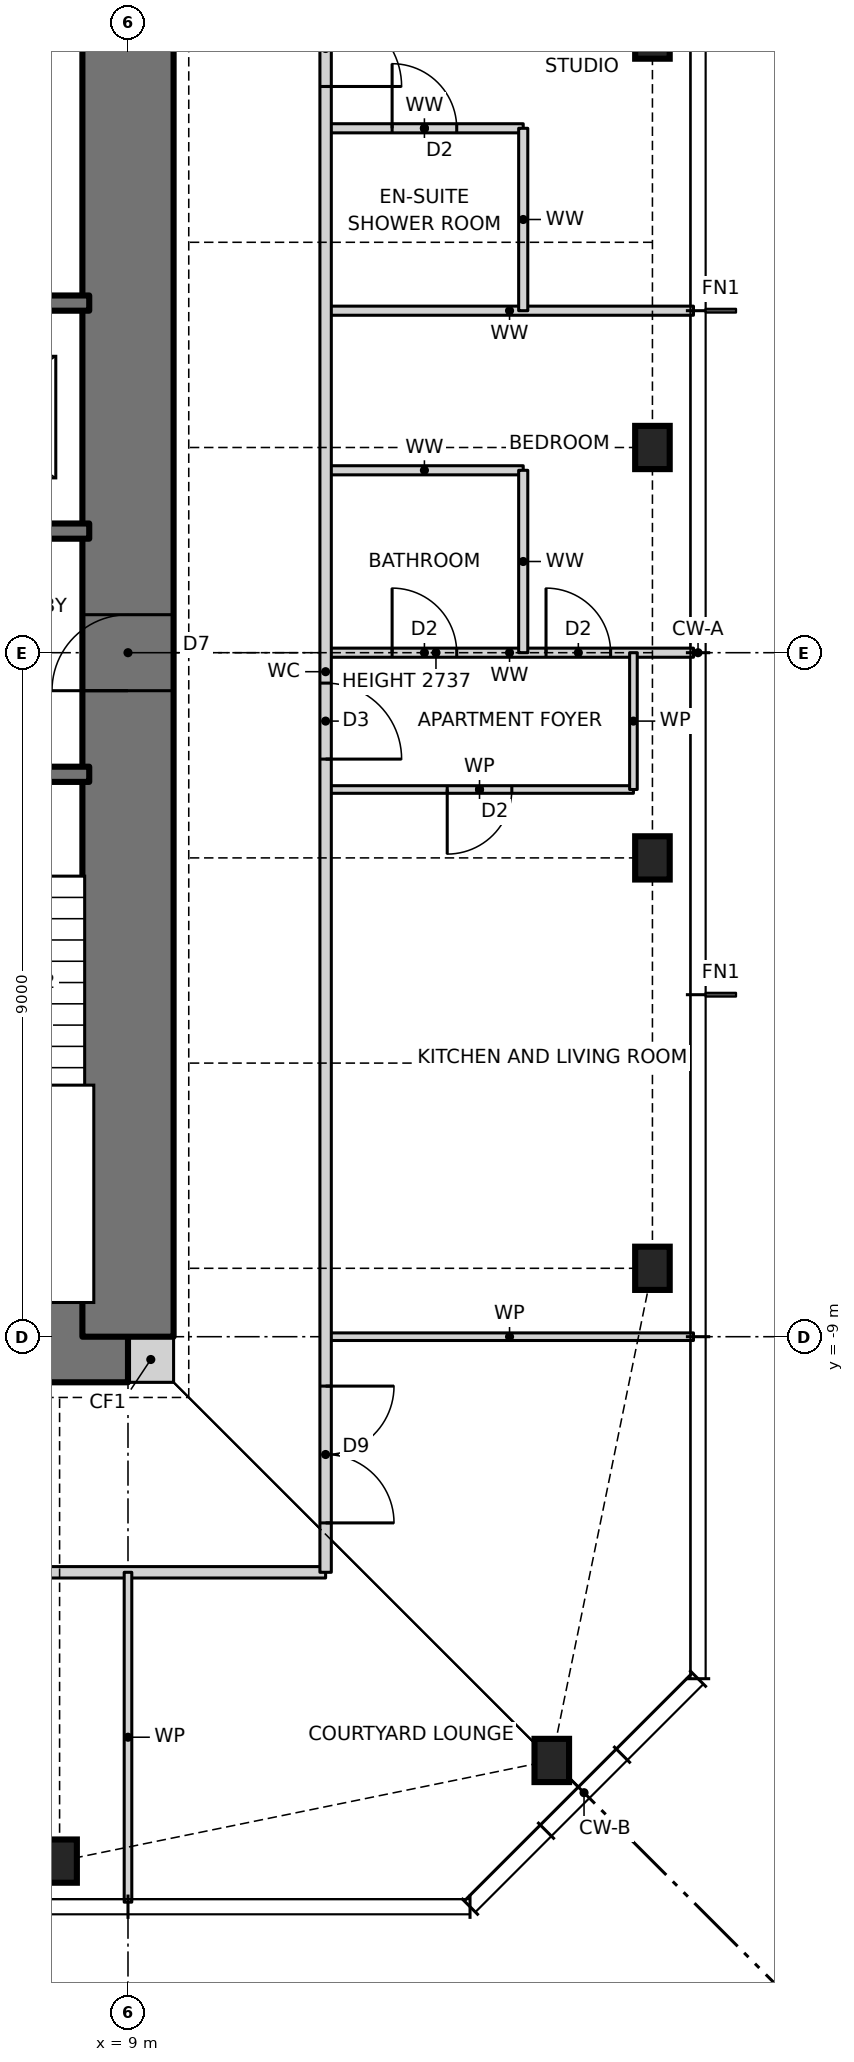
"""IFC4 building model, lengths in metres.
Left out: names, types, materials, properties, quantities, classifications, styles, units other than length and angle.
Written with IfcOpenShell. Run it as: python <this file> out.ifc"""

import sys

from ifc_helpers import new_model, si_unit, direction, frame, frame_2d, origin, origin_2d, place, context, subcontext, project, spatial, rectangle, i_section, extrude, element, fill, save


model = new_model("IFC4")
c1 = context("Model", 3, precision=1e-05, world=origin(), true_north=direction((0.0, 1.0)))
c2 = subcontext(c1, "Body", "Model", "MODEL_VIEW")
j1 = project(units=[si_unit("LENGTHUNIT", "METRE"), si_unit("PLANEANGLEUNIT", "RADIAN")], contexts=[c1])
p1 = place(None, origin())
s1 = spatial("IfcSite", under=j1, at=p1, CompositionType="ELEMENT")
p2 = place(p1, origin())
s2 = spatial("IfcBuilding", under=s1, at=p2, CompositionType="ELEMENT")
p3 = place(p2, frame((0.0, 0.0, 232.5)))
s3 = spatial("IfcBuildingStorey", under=s2, at=p3, CompositionType="ELEMENT", Elevation=232.5)
for number, where, z_axis, x_axis in (
    (1, (8.1, -15.9, 0.0), (0.0, 0.0, 1.0), (1.0, 0.0, 0.0)),
    (2, (14.576, -14.576, 0.0), (0.0, 0.0, 1.0), (1.0, 0.0, 0.0)),
    (3, (15.9, -8.1, 0.0), (0.0, 0.0, 1.0), (1.0, 0.0, 0.0)),
    (4, (15.9, -2.7, 0.0), (0.0, 0.0, 1.0), (1.0, 0.0, 0.0)),
    (5, (15.9, 2.7, 0.0), (0.0, 0.0, 1.0), (1.0, 0.0, 0.0)),
    (6, (15.9, 8.1, 0.0), (0.0, 0.0, 1.0), (1.0, 0.0, 0.0)),
):
    element("IfcColumn", number, at=place(p3, frame(where, z_axis=z_axis, x_axis=x_axis)), inside=s3, PredefinedType="COLUMN", context=c2, shape_type="SweptSolid", body=[
        extrude(i_section(OverallWidth=0.455, OverallDepth=0.569, WebThickness=0.078, FlangeThickness=0.125, at=origin_2d()), origin(), (0.0, 0.0, 1.0), 3.5),
    ])
p4 = place(p3, frame((9.0, -9.3, 0.0), z_axis=(0.0, 0.0, 1.0), x_axis=(1.0, 0.0, 0.0)))
e7 = element("IfcWall", 7, at=p4, inside=s3, PredefinedType="SOLIDWALL", context=c2, shape_type="SweptSolid", body=[
    extrude(rectangle(XDim=0.6, YDim=0.6, at=frame_2d((0.3, 0.0))), origin(), (0.0, 0.0, 1.0), 3.5),
])
p5 = place(p3, frame((-9.0, -9.0, 0.0), z_axis=(0.0, 0.0, 1.0), x_axis=(1.0, 0.0, 0.0)))
e8 = element("IfcWall", 8, at=p5, inside=s3, PredefinedType="SHEAR", context=c2, shape_type="SweptSolid", body=[
    extrude(rectangle(XDim=18.0, YDim=1.2, at=frame_2d((9.0, 0.0))), origin(), (0.0, 0.0, 1.0), 3.5),
])
p6 = place(p5, frame((3.775, 0.0, 0.0)))
e9 = element("IfcOpeningElement", 9, at=p6, cuts=e8, PredefinedType="OPENING", context=c2, shape_type="SweptSolid", body=[
    extrude(rectangle(XDim=0.9, YDim=2.1, at=frame_2d((0.45, 1.05))), frame((0.0, 0.61, 0.0), z_axis=(0.0, -1.0, 0.0), x_axis=(1.0, 0.0, 0.0)), (0.0, 0.0, 1.0), 1.22),
])
p7 = place(p5, frame((10.625, 0.0, 0.0)))
e10 = element("IfcOpeningElement", 10, at=p7, cuts=e8, PredefinedType="OPENING", context=c2, shape_type="SweptSolid", body=[
    extrude(rectangle(XDim=0.9, YDim=2.1, at=frame_2d((0.45, 1.05))), frame((0.0, 0.61, 0.0), z_axis=(0.0, -1.0, 0.0), x_axis=(1.0, 0.0, 0.0)), (0.0, 0.0, 1.0), 1.22),
])
p8 = place(p3, frame((9.0, -9.0, 0.0), z_axis=(0.0, 0.0, 1.0), x_axis=(0.0, 1.0, 0.0)))
e11 = element("IfcWall", 11, at=p8, inside=s3, PredefinedType="SHEAR", context=c2, shape_type="SweptSolid", body=[
    extrude(rectangle(XDim=18.0, YDim=1.2, at=frame_2d((9.0, 0.0))), origin(), (0.0, 0.0, 1.0), 3.5),
])
p9 = place(p8, frame((8.5, 0.0, 0.0)))
e12 = element("IfcOpeningElement", 12, at=p9, cuts=e11, PredefinedType="OPENING", context=c2, shape_type="SweptSolid", body=[
    extrude(rectangle(XDim=1.0, YDim=2.1, at=frame_2d((0.5, 1.05))), frame((0.0, 0.61, 0.0), z_axis=(0.0, -1.0, 0.0), x_axis=(1.0, 0.0, 0.0)), (0.0, 0.0, 1.0), 1.22),
])
p10 = place(p3, frame((-11.6, -12.1, 0.0), z_axis=(0.0, 0.0, 1.0), x_axis=(1.0, 0.0, 0.0)))
e13 = element("IfcWall", 13, at=p10, inside=s3, PredefinedType="PARTITIONING", context=c2, shape_type="SweptSolid", body=[
    extrude(rectangle(XDim=23.2, YDim=0.15, at=frame_2d((11.6, 0.0))), origin(), (0.0, 0.0, 1.0), 3.27),
])
p11 = place(p10, frame((10.2, 0.0, 0.0)))
e14 = element("IfcOpeningElement", 14, at=p11, cuts=e13, PredefinedType="OPENING", context=c2, shape_type="SweptSolid", body=[
    extrude(rectangle(XDim=1.0, YDim=2.1, at=frame_2d((0.5, 1.05))), frame((0.0, 0.085, 0.0), z_axis=(0.0, -1.0, 0.0), x_axis=(1.0, 0.0, 0.0)), (0.0, 0.0, 1.0), 0.17),
])
p12 = place(p10, frame((17.45, 0.0, 0.0)))
e15 = element("IfcOpeningElement", 15, at=p12, cuts=e13, PredefinedType="OPENING", context=c2, shape_type="SweptSolid", body=[
    extrude(rectangle(XDim=1.8, YDim=2.1, at=frame_2d((0.9, 1.05))), frame((0.0, 0.085, 0.0), z_axis=(0.0, -1.0, 0.0), x_axis=(1.0, 0.0, 0.0)), (0.0, 0.0, 1.0), 0.17),
])
p13 = place(p3, frame((11.6, -9.0, 0.0), z_axis=(0.0, 0.0, 1.0), x_axis=(1.0, 0.0, 0.0)))
e16 = element("IfcWall", 16, at=p13, inside=s3, PredefinedType="PARTITIONING", context=c2, shape_type="SweptSolid", body=[
    extrude(rectangle(XDim=4.84, YDim=0.1, at=frame_2d((2.42, 0.0))), origin(), (0.0, 0.0, 1.0), 3.27),
])
p14 = place(p3, frame((11.6, -1.8, 0.0), z_axis=(0.0, 0.0, 1.0), x_axis=(1.0, 0.0, 0.0)))
e17 = element("IfcWall", 17, at=p14, inside=s3, PredefinedType="PARTITIONING", context=c2, shape_type="SweptSolid", body=[
    extrude(rectangle(XDim=4.05, YDim=0.1, at=frame_2d((2.025, 0.0))), origin(), (0.0, 0.0, 1.0), 3.27),
])
p15 = place(p14, frame((1.6, 0.0, 0.0)))
e18 = element("IfcOpeningElement", 18, at=p15, cuts=e17, PredefinedType="OPENING", context=c2, shape_type="SweptSolid", body=[
    extrude(rectangle(XDim=0.85, YDim=2.1, at=frame_2d((0.425, 1.05))), frame((0.0, 0.06, 0.0), z_axis=(0.0, -1.0, 0.0), x_axis=(1.0, 0.0, 0.0)), (0.0, 0.0, 1.0), 0.12),
])
p16 = place(p3, frame((-8.49, -1.6, 0.0), z_axis=(0.0, 0.0, 1.0), x_axis=(1.0, 0.0, 0.0)))
e19 = element("IfcWall", 19, at=p16, inside=s3, PredefinedType="SOLIDWALL", context=c2, shape_type="SweptSolid", body=[
    extrude(rectangle(XDim=16.98, YDim=0.2, at=frame_2d((8.49, 0.0))), origin(), (0.0, 0.0, 1.0), 3.5),
])
p17 = place(p16, frame((14.81, 0.0, 0.0)))
e20 = element("IfcOpeningElement", 20, at=p17, cuts=e19, PredefinedType="OPENING", context=c2, shape_type="SweptSolid", body=[
    extrude(rectangle(XDim=1.0, YDim=2.1, at=frame_2d((0.5, 1.05))), frame((0.0, 0.11, 0.0), z_axis=(0.0, -1.0, 0.0), x_axis=(1.0, 0.0, 0.0)), (0.0, 0.0, 1.0), 0.22),
])
p18 = place(p16, frame((1.232, 0.0, 0.0)))
e21 = element("IfcOpeningElement", 21, at=p18, cuts=e19, PredefinedType="OPENING", context=c2, shape_type="SweptSolid", body=[
    extrude(rectangle(XDim=0.9, YDim=2.1, at=frame_2d((0.45, 1.05))), frame((0.0, 0.11, 0.0), z_axis=(0.0, -1.0, 0.0), x_axis=(1.0, 0.0, 0.0)), (0.0, 0.0, 1.0), 0.22),
])
p19 = place(p16, frame((4.627, 0.0, 0.0)))
e22 = element("IfcOpeningElement", 22, at=p19, cuts=e19, PredefinedType="OPENING", context=c2, shape_type="SweptSolid", body=[
    extrude(rectangle(XDim=0.9, YDim=2.1, at=frame_2d((0.45, 1.05))), frame((0.0, 0.11, 0.0), z_axis=(0.0, -1.0, 0.0), x_axis=(1.0, 0.0, 0.0)), (0.0, 0.0, 1.0), 0.22),
])
p20 = place(p16, frame((8.052, 0.0, 0.0)))
e23 = element("IfcOpeningElement", 23, at=p20, cuts=e19, PredefinedType="OPENING", context=c2, shape_type="SweptSolid", body=[
    extrude(rectangle(XDim=0.9, YDim=2.1, at=frame_2d((0.45, 1.05))), frame((0.0, 0.11, 0.0), z_axis=(0.0, -1.0, 0.0), x_axis=(1.0, 0.0, 0.0)), (0.0, 0.0, 1.0), 0.22),
])
p21 = place(p16, frame((11.478, 0.0, 0.0)))
e24 = element("IfcOpeningElement", 24, at=p21, cuts=e19, PredefinedType="OPENING", context=c2, shape_type="SweptSolid", body=[
    extrude(rectangle(XDim=0.9, YDim=2.1, at=frame_2d((0.45, 1.05))), frame((0.0, 0.11, 0.0), z_axis=(0.0, -1.0, 0.0), x_axis=(1.0, 0.0, 0.0)), (0.0, 0.0, 1.0), 0.22),
])
p22 = place(p3, frame((11.6, 0.0, 0.0), z_axis=(0.0, 0.0, 1.0), x_axis=(1.0, 0.0, 0.0)))
e25 = element("IfcWall", 25, at=p22, inside=s3, PredefinedType="PARTITIONING", context=c2, shape_type="SweptSolid", body=[
    extrude(rectangle(XDim=4.84, YDim=0.12, at=frame_2d((2.42, 0.0))), origin(), (0.0, 0.0, 1.0), 2.737),
])
p23 = place(p22, frame((2.9, 0.0, 0.0)))
e26 = element("IfcOpeningElement", 26, at=p23, cuts=e25, PredefinedType="OPENING", context=c2, shape_type="SweptSolid", body=[
    extrude(rectangle(XDim=0.85, YDim=2.1, at=frame_2d((0.425, 1.05))), frame((0.0, 0.07, 0.0), z_axis=(0.0, -1.0, 0.0), x_axis=(1.0, 0.0, 0.0)), (0.0, 0.0, 1.0), 0.14),
])
p24 = place(p22, frame((0.875, 0.0, 0.0)))
e27 = element("IfcOpeningElement", 27, at=p24, cuts=e25, PredefinedType="OPENING", context=c2, shape_type="SweptSolid", body=[
    extrude(rectangle(XDim=0.85, YDim=2.1, at=frame_2d((0.425, 1.05))), frame((0.0, 0.07, 0.0), z_axis=(0.0, -1.0, 0.0), x_axis=(1.0, 0.0, 0.0)), (0.0, 0.0, 1.0), 0.14),
])
p25 = place(p3, frame((-8.49, 1.6, 0.0), z_axis=(0.0, 0.0, 1.0), x_axis=(1.0, 0.0, 0.0)))
e28 = element("IfcWall", 28, at=p25, inside=s3, PredefinedType="SOLIDWALL", context=c2, shape_type="SweptSolid", body=[
    extrude(rectangle(XDim=16.98, YDim=0.2, at=frame_2d((8.49, 0.0))), origin(), (0.0, 0.0, 1.0), 3.5),
])
p26 = place(p25, frame((1.17, 0.0, 0.0)))
e29 = element("IfcOpeningElement", 29, at=p26, cuts=e28, PredefinedType="OPENING", context=c2, shape_type="SweptSolid", body=[
    extrude(rectangle(XDim=1.0, YDim=2.1, at=frame_2d((0.5, 1.05))), frame((0.0, 0.11, 0.0), z_axis=(0.0, -1.0, 0.0), x_axis=(1.0, 0.0, 0.0)), (0.0, 0.0, 1.0), 0.22),
])
p27 = place(p25, frame((4.606, 0.0, 0.0)))
e30 = element("IfcOpeningElement", 30, at=p27, cuts=e28, PredefinedType="OPENING", context=c2, shape_type="SweptSolid", body=[
    extrude(rectangle(XDim=0.9, YDim=2.1, at=frame_2d((0.45, 1.05))), frame((0.0, 0.11, 0.0), z_axis=(0.0, -1.0, 0.0), x_axis=(1.0, 0.0, 0.0)), (0.0, 0.0, 1.0), 0.22),
])
p28 = place(p25, frame((8.04, 0.0, 0.0)))
e31 = element("IfcOpeningElement", 31, at=p28, cuts=e28, PredefinedType="OPENING", context=c2, shape_type="SweptSolid", body=[
    extrude(rectangle(XDim=0.9, YDim=2.1, at=frame_2d((0.45, 1.05))), frame((0.0, 0.11, 0.0), z_axis=(0.0, -1.0, 0.0), x_axis=(1.0, 0.0, 0.0)), (0.0, 0.0, 1.0), 0.22),
])
p29 = place(p25, frame((11.374, 0.0, 0.0)))
e32 = element("IfcOpeningElement", 32, at=p29, cuts=e28, PredefinedType="OPENING", context=c2, shape_type="SweptSolid", body=[
    extrude(rectangle(XDim=1.1, YDim=2.1, at=frame_2d((0.55, 1.05))), frame((0.0, 0.11, 0.0), z_axis=(0.0, -1.0, 0.0), x_axis=(1.0, 0.0, 0.0)), (0.0, 0.0, 1.0), 0.22),
])
p30 = place(p25, frame((14.66, 0.0, 0.0)))
e33 = element("IfcOpeningElement", 33, at=p30, cuts=e28, PredefinedType="OPENING", context=c2, shape_type="SweptSolid", body=[
    extrude(rectangle(XDim=1.3, YDim=2.1, at=frame_2d((0.65, 1.05))), frame((0.0, 0.11, 0.0), z_axis=(0.0, -1.0, 0.0), x_axis=(1.0, 0.0, 0.0)), (0.0, 0.0, 1.0), 0.22),
])
p31 = place(p3, frame((11.6, 2.4, 0.0), z_axis=(0.0, 0.0, 1.0), x_axis=(1.0, 0.0, 0.0)))
e34 = element("IfcWall", 34, at=p31, inside=s3, PredefinedType="PARTITIONING", context=c2, shape_type="SweptSolid", body=[
    extrude(rectangle(XDim=2.6, YDim=0.12, at=frame_2d((1.3, 0.0))), origin(), (0.0, 0.0, 1.0), 3.27),
])
p32 = place(p3, frame((11.6, 4.5, 0.0), z_axis=(0.0, 0.0, 1.0), x_axis=(1.0, 0.0, 0.0)))
e35 = element("IfcWall", 35, at=p32, inside=s3, PredefinedType="PARTITIONING", context=c2, shape_type="SweptSolid", body=[
    extrude(rectangle(XDim=4.84, YDim=0.12, at=frame_2d((2.42, 0.0))), origin(), (0.0, 0.0, 1.0), 3.27),
])
p33 = place(p3, frame((5.15, 4.6, 0.0), z_axis=(0.0, 0.0, 1.0), x_axis=(1.0, 0.0, 0.0)))
e36 = element("IfcWall", 36, at=p33, inside=s3, PredefinedType="SOLIDWALL", context=c2, shape_type="SweptSolid", body=[
    extrude(rectangle(XDim=3.34, YDim=0.2, at=frame_2d((1.67, 0.0))), origin(), (0.0, 0.0, 1.0), 3.5),
])
p34 = place(p3, frame((11.6, 6.9, 0.0), z_axis=(0.0, 0.0, 1.0), x_axis=(1.0, 0.0, 0.0)))
e37 = element("IfcWall", 37, at=p34, inside=s3, PredefinedType="PARTITIONING", context=c2, shape_type="SweptSolid", body=[
    extrude(rectangle(XDim=2.6, YDim=0.12, at=frame_2d((1.3, 0.0))), origin(), (0.0, 0.0, 1.0), 3.27),
])
p35 = place(p34, frame((0.875, 0.0, 0.0)))
e38 = element("IfcOpeningElement", 38, at=p35, cuts=e37, PredefinedType="OPENING", context=c2, shape_type="SweptSolid", body=[
    extrude(rectangle(XDim=0.85, YDim=2.1, at=frame_2d((0.425, 1.05))), frame((0.0, 0.07, 0.0), z_axis=(0.0, -1.0, 0.0), x_axis=(1.0, 0.0, 0.0)), (0.0, 0.0, 1.0), 0.14),
])
p36 = place(p3, frame((15.65, -1.8, 0.0), z_axis=(0.0, 0.0, 1.0), x_axis=(0.0, 1.0, 0.0)))
e39 = element("IfcWall", 39, at=p36, inside=s3, PredefinedType="PARTITIONING", context=c2, shape_type="SweptSolid", body=[
    extrude(rectangle(XDim=1.8, YDim=0.1, at=frame_2d((0.9, 0.0))), origin(), (0.0, 0.0, 1.0), 3.27),
])
for number, where, z_axis, x_axis in (
    (40, (14.2, 0.0, 0.0), (0.0, 0.0, 1.0), (0.0, 1.0, 0.0)),
    (41, (14.2, 4.5, 0.0), (0.0, 0.0, 1.0), (0.0, 1.0, 0.0)),
):
    element("IfcWall", number, at=place(p3, frame(where, z_axis=z_axis, x_axis=x_axis)), inside=s3, PredefinedType="PARTITIONING", context=c2, shape_type="SweptSolid", body=[
        extrude(rectangle(XDim=2.4, YDim=0.12, at=frame_2d((1.2, 0.0))), origin(), (0.0, 0.0, 1.0), 3.27),
    ])
p37 = place(p3, frame((11.6, -12.1, 0.0), z_axis=(0.0, 0.0, 1.0), x_axis=(0.0, 1.0, 0.0)))
e42 = element("IfcWall", 42, at=p37, inside=s3, PredefinedType="PARTITIONING", context=c2, shape_type="SweptSolid", body=[
    extrude(rectangle(XDim=23.7, YDim=0.15, at=frame_2d((11.85, 0.0))), origin(), (0.0, 0.0, 1.0), 3.27),
])
p38 = place(p37, frame((10.7, 0.0, 0.0)))
e43 = element("IfcOpeningElement", 43, at=p38, cuts=e42, PredefinedType="OPENING", context=c2, shape_type="SweptSolid", body=[
    extrude(rectangle(XDim=1.0, YDim=2.1, at=frame_2d((0.5, 1.05))), frame((0.0, 0.085, 0.0), z_axis=(0.0, -1.0, 0.0), x_axis=(1.0, 0.0, 0.0)), (0.0, 0.0, 1.0), 0.17),
])
p39 = place(p37, frame((19.55, 0.0, 0.0)))
e44 = element("IfcOpeningElement", 44, at=p39, cuts=e42, PredefinedType="OPENING", context=c2, shape_type="SweptSolid", body=[
    extrude(rectangle(XDim=1.0, YDim=2.1, at=frame_2d((0.5, 1.05))), frame((0.0, 0.085, 0.0), z_axis=(0.0, -1.0, 0.0), x_axis=(1.0, 0.0, 0.0)), (0.0, 0.0, 1.0), 0.17),
])
p40 = place(p37, frame((21.5, 0.0, 0.0)))
e45 = element("IfcOpeningElement", 45, at=p40, cuts=e42, PredefinedType="OPENING", context=c2, shape_type="SweptSolid", body=[
    extrude(rectangle(XDim=1.8, YDim=2.1, at=frame_2d((0.9, 1.05))), frame((0.0, 0.085, 0.0), z_axis=(0.0, -1.0, 0.0), x_axis=(1.0, 0.0, 0.0)), (0.0, 0.0, 1.0), 0.17),
])
p41 = place(p37, frame((0.65, 0.0, 0.0)))
e46 = element("IfcOpeningElement", 46, at=p41, cuts=e42, PredefinedType="OPENING", context=c2, shape_type="SweptSolid", body=[
    extrude(rectangle(XDim=1.8, YDim=2.1, at=frame_2d((0.9, 1.05))), frame((0.0, 0.085, 0.0), z_axis=(0.0, -1.0, 0.0), x_axis=(1.0, 0.0, 0.0)), (0.0, 0.0, 1.0), 0.17),
])
p42 = place(p3, frame((9.0, -16.44, 0.0), z_axis=(0.0, 0.0, 1.0), x_axis=(0.0, 1.0, 0.0)))
e47 = element("IfcWall", 47, at=p42, inside=s3, PredefinedType="PARTITIONING", context=c2, shape_type="SweptSolid", body=[
    extrude(rectangle(XDim=4.34, YDim=0.1, at=frame_2d((2.17, 0.0))), origin(), (0.0, 0.0, 1.0), 3.27),
])
p43 = place(p38, frame((1.0, 0.0, 0.0), z_axis=(0.0, 0.0, 1.0), x_axis=(-1.0, 0.0, 0.0)))
e48 = element("IfcDoor", 48, at=p43, inside=s3, OperationType="SINGLE_SWING_RIGHT", PredefinedType="DOOR", context=c2, shape_type="SweptSolid", body=[
    extrude(rectangle(XDim=1.0, YDim=2.1, at=frame_2d((0.5, 1.05))), frame((0.0, 0.025, 0.0), z_axis=(0.0, -1.0, 0.0), x_axis=(1.0, 0.0, 0.0)), (0.0, 0.0, 1.0), 0.05),
])
fill(e43, e48)
p44 = place(p15, frame((0.85, 0.0, 0.0), z_axis=(0.0, 0.0, 1.0), x_axis=(-1.0, 0.0, 0.0)))
e49 = element("IfcDoor", 49, at=p44, inside=s3, OperationType="SINGLE_SWING_RIGHT", PredefinedType="DOOR", context=c2, shape_type="SweptSolid", body=[
    extrude(rectangle(XDim=0.85, YDim=2.1, at=frame_2d((0.425, 1.05))), frame((0.0, 0.025, 0.0), z_axis=(0.0, -1.0, 0.0), x_axis=(1.0, 0.0, 0.0)), (0.0, 0.0, 1.0), 0.05),
])
fill(e18, e49)
p45 = place(p23, origin())
e50 = element("IfcDoor", 50, at=p45, inside=s3, OperationType="SINGLE_SWING_LEFT", PredefinedType="DOOR", context=c2, shape_type="SweptSolid", body=[
    extrude(rectangle(XDim=0.85, YDim=2.1, at=frame_2d((0.425, 1.05))), frame((0.0, 0.025, 0.0), z_axis=(0.0, -1.0, 0.0), x_axis=(1.0, 0.0, 0.0)), (0.0, 0.0, 1.0), 0.05),
])
fill(e26, e50)
p46 = place(p24, origin())
e51 = element("IfcDoor", 51, at=p46, inside=s3, OperationType="SINGLE_SWING_LEFT", PredefinedType="DOOR", context=c2, shape_type="SweptSolid", body=[
    extrude(rectangle(XDim=0.85, YDim=2.1, at=frame_2d((0.425, 1.05))), frame((0.0, 0.025, 0.0), z_axis=(0.0, -1.0, 0.0), x_axis=(1.0, 0.0, 0.0)), (0.0, 0.0, 1.0), 0.05),
])
fill(e27, e51)
p47 = place(p39, frame((1.0, 0.0, 0.0), z_axis=(0.0, 0.0, 1.0), x_axis=(-1.0, 0.0, 0.0)))
e52 = element("IfcDoor", 52, at=p47, inside=s3, OperationType="SINGLE_SWING_RIGHT", PredefinedType="DOOR", context=c2, shape_type="SweptSolid", body=[
    extrude(rectangle(XDim=1.0, YDim=2.1, at=frame_2d((0.5, 1.05))), frame((0.0, 0.025, 0.0), z_axis=(0.0, -1.0, 0.0), x_axis=(1.0, 0.0, 0.0)), (0.0, 0.0, 1.0), 0.05),
])
fill(e44, e52)
p48 = place(p35, origin())
e53 = element("IfcDoor", 53, at=p48, inside=s3, OperationType="SINGLE_SWING_LEFT", PredefinedType="DOOR", context=c2, shape_type="SweptSolid", body=[
    extrude(rectangle(XDim=0.85, YDim=2.1, at=frame_2d((0.425, 1.05))), frame((0.0, 0.025, 0.0), z_axis=(0.0, -1.0, 0.0), x_axis=(1.0, 0.0, 0.0)), (0.0, 0.0, 1.0), 0.05),
])
fill(e38, e53)
p49 = place(p41, frame((1.8, 0.0, 0.0), z_axis=(0.0, 0.0, 1.0), x_axis=(-1.0, 0.0, 0.0)))
e54 = element("IfcDoor", 54, at=p49, inside=s3, OperationType="DOUBLE_DOOR_SINGLE_SWING", PredefinedType="DOOR", context=c2, shape_type="SweptSolid", body=[
    extrude(rectangle(XDim=1.8, YDim=2.1, at=frame_2d((0.9, 1.05))), frame((0.0, 0.025, 0.0), z_axis=(0.0, -1.0, 0.0), x_axis=(1.0, 0.0, 0.0)), (0.0, 0.0, 1.0), 0.05),
])
fill(e46, e54)
p50 = place(p9, origin())
e55 = element("IfcDoor", 55, at=p50, inside=s3, OperationType="SINGLE_SWING_LEFT", PredefinedType="DOOR", context=c2, shape_type="SweptSolid", body=[
    extrude(rectangle(XDim=1.0, YDim=2.1, at=frame_2d((0.5, 1.05))), frame((0.0, 0.025, 0.0), z_axis=(0.0, -1.0, 0.0), x_axis=(1.0, 0.0, 0.0)), (0.0, 0.0, 1.0), 0.05),
])
fill(e12, e55)
save(model, sys.argv[1])
